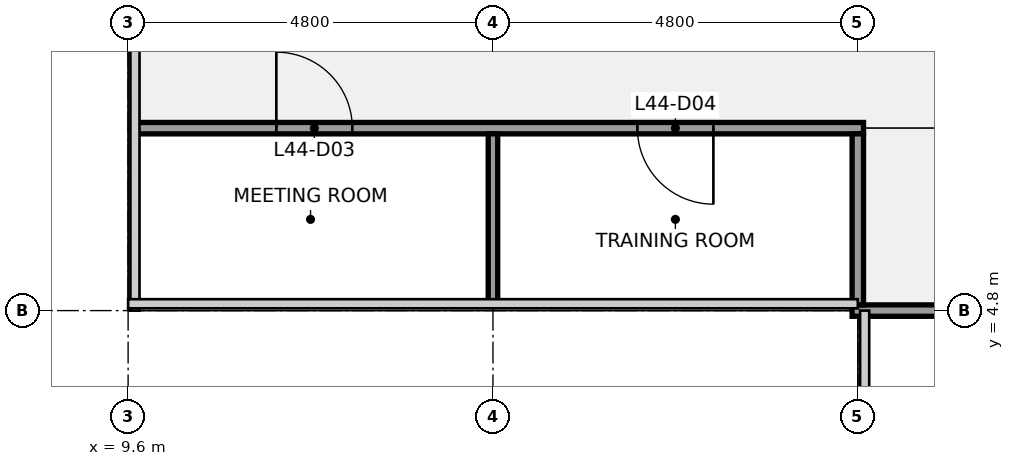
"""IFC4 building model, lengths in metres.
Left out: names, types, materials, properties, quantities, classifications, styles, units other than length and angle.
Written with IfcOpenShell. Run it as: python <this file> out.ifc"""

import sys

from ifc_helpers import new_model, si_unit, direction, frame, frame_2d, origin, place, context, subcontext, project, spatial, rectangle, extrude, element, fill, save


model = new_model("IFC4")
c1 = context("Model", 3, precision=1e-05, world=origin(), true_north=direction((0.0, 1.0)))
c2 = subcontext(c1, "Body", "Model", "MODEL_VIEW")
j1 = project(units=[si_unit("LENGTHUNIT", "METRE"), si_unit("PLANEANGLEUNIT", "RADIAN")], contexts=[c1])
p1 = place(None, origin())
s1 = spatial("IfcSite", under=j1, at=p1, CompositionType="ELEMENT")
p2 = place(p1, origin())
s2 = spatial("IfcBuilding", under=s1, at=p2, CompositionType="ELEMENT")
p3 = place(p2, frame((0.0, 0.0, 205.2)))
s3 = spatial("IfcBuildingStorey", under=s2, at=p3, CompositionType="ELEMENT", Elevation=205.2)
p4 = place(p3, frame((19.125, 4.8, 0.0), z_axis=(0.0, 0.0, 1.0), x_axis=(1.0, 0.0, 0.0)))
e1 = element("IfcWall", 1, at=p4, inside=s3, PredefinedType="PARTITIONING", context=c2, shape_type="SweptSolid", body=[
    extrude(rectangle(XDim=19.35, YDim=0.15, at=frame_2d((9.675, 0.0))), origin(), (0.0, 0.0, 1.0), 2.849),
])
p5 = place(p4, frame((4.375, 0.0, 0.0)))
e2 = element("IfcOpeningElement", 2, at=p5, cuts=e1, PredefinedType="OPENING", context=c2, shape_type="SweptSolid", body=[
    extrude(rectangle(XDim=1.0, YDim=2.1, at=frame_2d((0.5, 1.05))), frame((0.0, 0.085, 0.0), z_axis=(0.0, -1.0, 0.0), x_axis=(1.0, 0.0, 0.0)), (0.0, 0.0, 1.0), 0.17),
])
p6 = place(p4, frame((13.975, 0.0, 0.0)))
e3 = element("IfcOpeningElement", 3, at=p6, cuts=e1, PredefinedType="OPENING", context=c2, shape_type="SweptSolid", body=[
    extrude(rectangle(XDim=1.0, YDim=2.1, at=frame_2d((0.5, 1.05))), frame((0.0, 0.085, 0.0), z_axis=(0.0, -1.0, 0.0), x_axis=(1.0, 0.0, 0.0)), (0.0, 0.0, 1.0), 0.17),
])
p7 = place(p3, frame((9.7, 7.2, 0.0), z_axis=(0.0, 0.0, 1.0), x_axis=(1.0, 0.0, 0.0)))
e4 = element("IfcWall", 4, at=p7, inside=s3, PredefinedType="PARTITIONING", context=c2, shape_type="SweptSolid", body=[
    extrude(rectangle(XDim=9.575, YDim=0.15, at=frame_2d((4.788, 0.0))), origin(), (0.0, 0.0, 1.0), 2.849),
])
p8 = place(p7, frame((1.85, 0.0, 0.0)))
e5 = element("IfcOpeningElement", 5, at=p8, cuts=e4, PredefinedType="OPENING", context=c2, shape_type="SweptSolid", body=[
    extrude(rectangle(XDim=1.0, YDim=2.1, at=frame_2d((0.5, 1.05))), frame((0.0, 0.085, 0.0), z_axis=(0.0, -1.0, 0.0), x_axis=(1.0, 0.0, 0.0)), (0.0, 0.0, 1.0), 0.17),
])
p9 = place(p7, frame((6.6, 0.0, 0.0)))
e6 = element("IfcOpeningElement", 6, at=p9, cuts=e4, PredefinedType="OPENING", context=c2, shape_type="SweptSolid", body=[
    extrude(rectangle(XDim=1.0, YDim=2.1, at=frame_2d((0.5, 1.05))), frame((0.0, 0.085, 0.0), z_axis=(0.0, -1.0, 0.0), x_axis=(1.0, 0.0, 0.0)), (0.0, 0.0, 1.0), 0.17),
])
p10 = place(p3, frame((14.4, 4.9, 0.0), z_axis=(0.0, 0.0, 1.0), x_axis=(0.0, 1.0, 0.0)))
e7 = element("IfcWall", 7, at=p10, inside=s3, PredefinedType="PARTITIONING", context=c2, shape_type="SweptSolid", body=[
    extrude(rectangle(XDim=2.225, YDim=0.125, at=frame_2d((1.113, 0.0))), origin(), (0.0, 0.0, 1.0), 2.849),
])
p11 = place(p3, frame((19.2, 4.875, 0.0), z_axis=(0.0, 0.0, 1.0), x_axis=(0.0, 1.0, 0.0)))
e8 = element("IfcWall", 8, at=p11, inside=s3, PredefinedType="PARTITIONING", context=c2, shape_type="SweptSolid", body=[
    extrude(rectangle(XDim=2.25, YDim=0.15, at=frame_2d((1.125, 0.0))), origin(), (0.0, 0.0, 1.0), 2.849),
])
p12 = place(p8, origin())
e9 = element("IfcDoor", 9, at=p12, inside=s3, OperationType="SINGLE_SWING_LEFT", PredefinedType="DOOR", context=c2, shape_type="SweptSolid", body=[
    extrude(rectangle(XDim=1.0, YDim=2.1, at=frame_2d((0.5, 1.05))), frame((0.0, 0.025, 0.0), z_axis=(0.0, -1.0, 0.0), x_axis=(1.0, 0.0, 0.0)), (0.0, 0.0, 1.0), 0.05),
])
fill(e5, e9)
p13 = place(p9, origin())
e10 = element("IfcDoor", 10, at=p13, inside=s3, OperationType="SINGLE_SWING_RIGHT", PredefinedType="DOOR", context=c2, shape_type="SweptSolid", body=[
    extrude(rectangle(XDim=1.0, YDim=2.1, at=frame_2d((0.5, 1.05))), frame((0.0, 0.025, 0.0), z_axis=(0.0, -1.0, 0.0), x_axis=(1.0, 0.0, 0.0)), (0.0, 0.0, 1.0), 0.05),
])
fill(e6, e10)
save(model, sys.argv[1])
